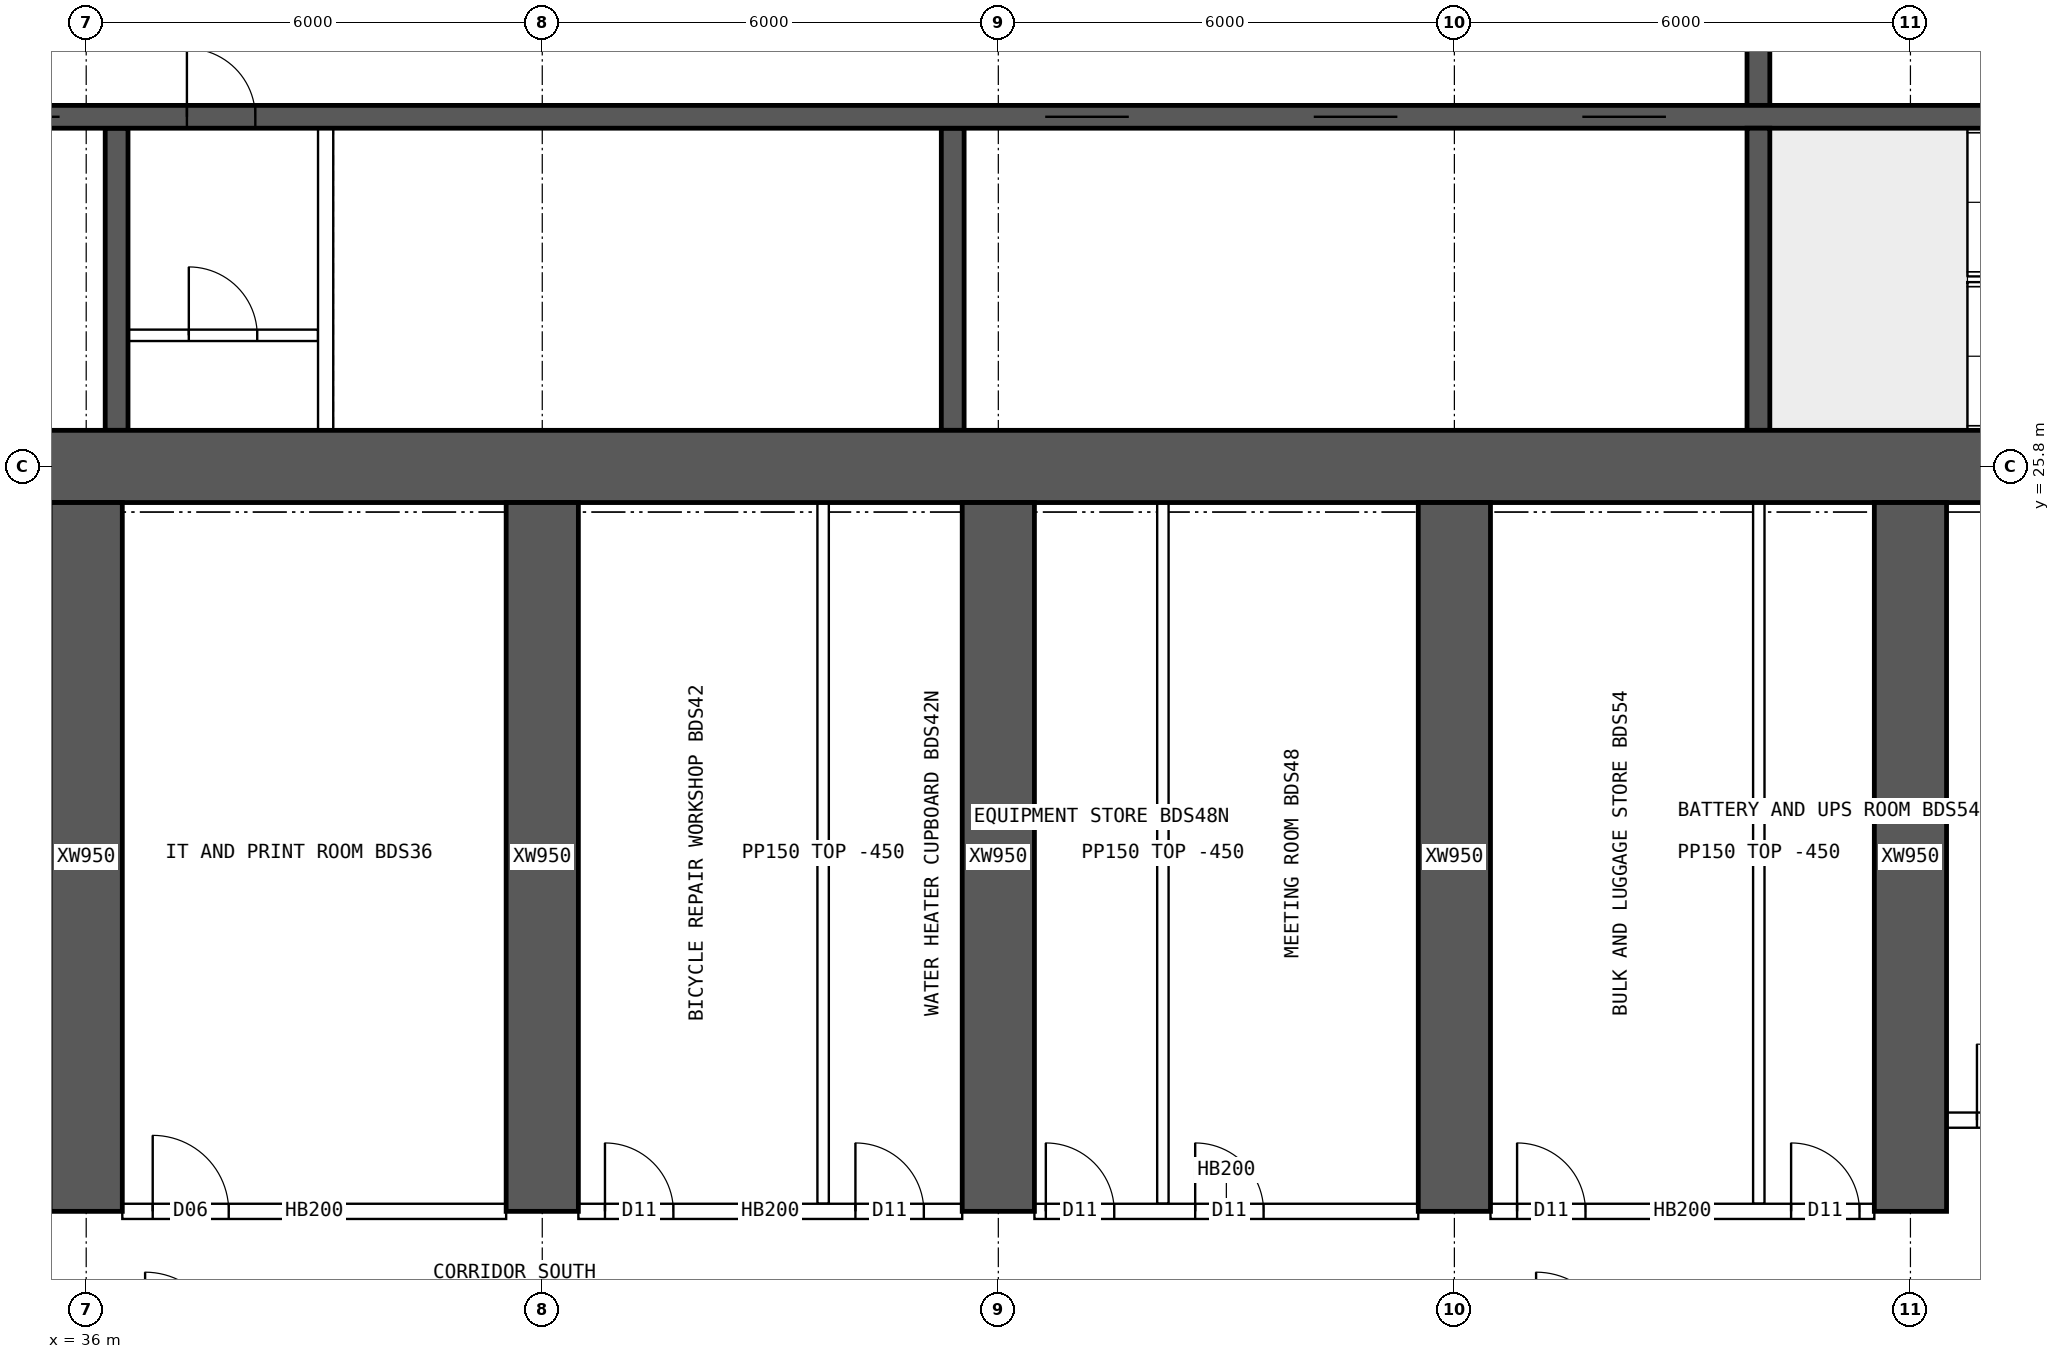
"""IFC4 building model, lengths in metres.
Left out: names, types, materials, properties, quantities, classifications, styles, units other than length and angle.
Written with IfcOpenShell. Run it as: python <this file> out.ifc"""

import sys

from ifc_helpers import new_model, si_unit, direction, frame, frame_2d, origin, place, context, subcontext, project, spatial, rectangle, extrude, element, fill, save


model = new_model("IFC4")
c1 = context("Model", 3, precision=1e-05, world=origin(), true_north=direction((0.0, 1.0)))
c2 = subcontext(c1, "Body", "Model", "MODEL_VIEW")
j1 = project(units=[si_unit("LENGTHUNIT", "METRE"), si_unit("PLANEANGLEUNIT", "RADIAN")], contexts=[c1])
p1 = place(None, origin())
s1 = spatial("IfcSite", under=j1, at=p1, CompositionType="ELEMENT")
p2 = place(p1, origin())
s2 = spatial("IfcBuilding", under=s1, at=p2, CompositionType="ELEMENT")
p3 = place(p2, frame((0.0, 0.0, 110.65)))
s3 = spatial("IfcBuildingStorey", under=s2, at=p3, CompositionType="ELEMENT", Elevation=110.65)
p4 = place(p3, frame((18.0, 25.8, 0.0), z_axis=(0.0, 0.0, 1.0), x_axis=(1.0, 0.0, 0.0)))
e1 = element("IfcWall", 1, at=p4, inside=s3, PredefinedType="SHEAR", context=c2, shape_type="SweptSolid", body=[
    extrude(rectangle(XDim=48.0, YDim=0.95, at=frame_2d((24.0, 0.0))), origin(), (0.0, 0.0, 1.0), 3.75),
])
p5 = place(p3, frame((18.475, 30.4, 0.0), z_axis=(0.0, 0.0, 1.0), x_axis=(1.0, 0.0, 0.0)))
e2 = element("IfcWall", 2, at=p5, inside=s3, PredefinedType="SHEAR", context=c2, shape_type="SweptSolid", body=[
    extrude(rectangle(XDim=47.05, YDim=0.3, at=frame_2d((23.525, 0.0))), origin(), (0.0, 0.0, 1.0), 3.75),
])
p6 = place(p5, frame((0.4, 0.0, 0.0)))
e3 = element("IfcOpeningElement", 3, at=p6, cuts=e2, PredefinedType="OPENING", context=c2, shape_type="SweptSolid", body=[
    extrude(rectangle(XDim=1.0, YDim=2.1, at=frame_2d((0.5, 1.05))), frame((0.0, 0.16, 0.0), z_axis=(0.0, -1.0, 0.0), x_axis=(1.0, 0.0, 0.0)), (0.0, 0.0, 1.0), 0.32),
])
p7 = place(p5, frame((45.65, 0.0, 0.0)))
e4 = element("IfcOpeningElement", 4, at=p7, cuts=e2, PredefinedType="OPENING", context=c2, shape_type="SweptSolid", body=[
    extrude(rectangle(XDim=1.0, YDim=2.1, at=frame_2d((0.5, 1.05))), frame((0.0, 0.16, 0.0), z_axis=(0.0, -1.0, 0.0), x_axis=(1.0, 0.0, 0.0)), (0.0, 0.0, 1.0), 0.32),
])
p8 = place(p5, frame((8.275, 0.0, 0.0)))
e5 = element("IfcOpeningElement", 5, at=p8, cuts=e2, PredefinedType="OPENING", context=c2, shape_type="SweptSolid", body=[
    extrude(rectangle(XDim=1.1, YDim=2.1, at=frame_2d((0.55, 1.05))), frame((0.0, 0.16, 0.0), z_axis=(0.0, -1.0, 0.0), x_axis=(1.0, 0.0, 0.0)), (0.0, 0.0, 1.0), 0.32),
])
p9 = place(p5, frame((10.875, 0.0, 0.0)))
e6 = element("IfcOpeningElement", 6, at=p9, cuts=e2, PredefinedType="OPENING", context=c2, shape_type="SweptSolid", body=[
    extrude(rectangle(XDim=1.1, YDim=2.1, at=frame_2d((0.55, 1.05))), frame((0.0, 0.16, 0.0), z_axis=(0.0, -1.0, 0.0), x_axis=(1.0, 0.0, 0.0)), (0.0, 0.0, 1.0), 0.32),
])
p10 = place(p5, frame((13.475, 0.0, 0.0)))
e7 = element("IfcOpeningElement", 7, at=p10, cuts=e2, PredefinedType="OPENING", context=c2, shape_type="SweptSolid", body=[
    extrude(rectangle(XDim=1.1, YDim=2.1, at=frame_2d((0.55, 1.05))), frame((0.0, 0.16, 0.0), z_axis=(0.0, -1.0, 0.0), x_axis=(1.0, 0.0, 0.0)), (0.0, 0.0, 1.0), 0.32),
])
p11 = place(p5, frame((16.075, 0.0, 0.0)))
e8 = element("IfcOpeningElement", 8, at=p11, cuts=e2, PredefinedType="OPENING", context=c2, shape_type="SweptSolid", body=[
    extrude(rectangle(XDim=1.1, YDim=2.1, at=frame_2d((0.55, 1.05))), frame((0.0, 0.16, 0.0), z_axis=(0.0, -1.0, 0.0), x_axis=(1.0, 0.0, 0.0)), (0.0, 0.0, 1.0), 0.32),
])
p12 = place(p5, frame((18.85, 0.0, 0.0)))
e9 = element("IfcOpeningElement", 9, at=p12, cuts=e2, PredefinedType="OPENING", context=c2, shape_type="SweptSolid", body=[
    extrude(rectangle(XDim=0.9, YDim=2.1, at=frame_2d((0.45, 1.05))), frame((0.0, 0.16, 0.0), z_axis=(0.0, -1.0, 0.0), x_axis=(1.0, 0.0, 0.0)), (0.0, 0.0, 1.0), 0.32),
])
p13 = place(p5, frame((30.142, 0.0, 0.0)))
e10 = element("IfcOpeningElement", 10, at=p13, cuts=e2, PredefinedType="OPENING", context=c2, shape_type="SweptSolid", body=[
    extrude(rectangle(XDim=1.1, YDim=2.1, at=frame_2d((0.55, 1.05))), frame((0.0, 0.16, 0.0), z_axis=(0.0, -1.0, 0.0), x_axis=(1.0, 0.0, 0.0)), (0.0, 0.0, 1.0), 0.32),
])
p14 = place(p5, frame((33.675, 0.0, 0.0)))
e11 = element("IfcOpeningElement", 11, at=p14, cuts=e2, PredefinedType="OPENING", context=c2, shape_type="SweptSolid", body=[
    extrude(rectangle(XDim=1.1, YDim=2.1, at=frame_2d((0.55, 1.05))), frame((0.0, 0.16, 0.0), z_axis=(0.0, -1.0, 0.0), x_axis=(1.0, 0.0, 0.0)), (0.0, 0.0, 1.0), 0.32),
])
p15 = place(p5, frame((37.208, 0.0, 0.0)))
e12 = element("IfcOpeningElement", 12, at=p15, cuts=e2, PredefinedType="OPENING", context=c2, shape_type="SweptSolid", body=[
    extrude(rectangle(XDim=1.1, YDim=2.1, at=frame_2d((0.55, 1.05))), frame((0.0, 0.16, 0.0), z_axis=(0.0, -1.0, 0.0), x_axis=(1.0, 0.0, 0.0)), (0.0, 0.0, 1.0), 0.32),
])
p16 = place(p3, frame((58.0, 26.275, 0.0), z_axis=(0.0, 0.0, 1.0), x_axis=(0.0, 1.0, 0.0)))
e13 = element("IfcWall", 13, at=p16, inside=s3, PredefinedType="SHEAR", context=c2, shape_type="SweptSolid", body=[
    extrude(rectangle(XDim=3.975, YDim=0.3, at=frame_2d((1.988, 0.0))), origin(), (0.0, 0.0, 1.0), 3.75),
])
p17 = place(p3, frame((58.0, 30.55, 0.0), z_axis=(0.0, 0.0, 1.0), x_axis=(0.0, 1.0, 0.0)))
e14 = element("IfcWall", 14, at=p17, inside=s3, PredefinedType="SHEAR", context=c2, shape_type="SweptSolid", body=[
    extrude(rectangle(XDim=3.9, YDim=0.3, at=frame_2d((1.95, 0.0))), origin(), (0.0, 0.0, 1.0), 3.75),
])
p18 = place(p17, frame((1.4, 0.0, 0.0)))
e15 = element("IfcOpeningElement", 15, at=p18, cuts=e14, PredefinedType="OPENING", context=c2, shape_type="SweptSolid", body=[
    extrude(rectangle(XDim=1.2, YDim=2.1, at=frame_2d((0.6, 1.05))), frame((0.0, 0.16, 0.0), z_axis=(0.0, -1.0, 0.0), x_axis=(1.0, 0.0, 0.0)), (0.0, 0.0, 1.0), 0.32),
])
for number, where, z_axis, x_axis in (
    (16, (36.4, 26.275, 0.0), (0.0, 0.0, 1.0), (0.0, 1.0, 0.0)),
    (17, (47.4, 26.275, 0.0), (0.0, 0.0, 1.0), (0.0, 1.0, 0.0)),
):
    element("IfcWall", number, at=place(p3, frame(where, z_axis=z_axis, x_axis=x_axis)), inside=s3, PredefinedType="SHEAR", context=c2, shape_type="SweptSolid", body=[
        extrude(rectangle(XDim=3.975, YDim=0.3, at=frame_2d((1.988, 0.0))), origin(), (0.0, 0.0, 1.0), 3.75),
    ])
for number, where, z_axis, x_axis in (
    (18, (36.0, 16.0, 0.0), (0.0, 0.0, 1.0), (0.0, 1.0, 0.0)),
    (19, (42.0, 16.0, 0.0), (0.0, 0.0, 1.0), (0.0, 1.0, 0.0)),
    (20, (48.0, 16.0, 0.0), (0.0, 0.0, 1.0), (0.0, 1.0, 0.0)),
    (21, (54.0, 16.0, 0.0), (0.0, 0.0, 1.0), (0.0, 1.0, 0.0)),
    (22, (60.0, 16.0, 0.0), (0.0, 0.0, 1.0), (0.0, 1.0, 0.0)),
):
    element("IfcWall", number, at=place(p3, frame(where, z_axis=z_axis, x_axis=x_axis)), inside=s3, PredefinedType="SHEAR", context=c2, shape_type="SweptSolid", body=[
        extrude(rectangle(XDim=9.325, YDim=0.95, at=frame_2d((4.663, 0.0))), origin(), (0.0, 0.0, 1.0), 3.75),
    ])
p19 = place(p3, frame((36.55, 27.525, 0.0), z_axis=(0.0, 0.0, 1.0), x_axis=(1.0, 0.0, 0.0)))
e23 = element("IfcWall", 23, at=p19, inside=s3, PredefinedType="SOLIDWALL", context=c2, shape_type="SweptSolid", body=[
    extrude(rectangle(XDim=2.5, YDim=0.15, at=frame_2d((1.25, 0.0))), origin(), (0.0, 0.0, 1.0), 3.3),
])
p20 = place(p19, frame((0.8, 0.0, 0.0)))
e24 = element("IfcOpeningElement", 24, at=p20, cuts=e23, PredefinedType="OPENING", context=c2, shape_type="SweptSolid", body=[
    extrude(rectangle(XDim=0.9, YDim=2.1, at=frame_2d((0.45, 1.05))), frame((0.0, 0.085, 0.0), z_axis=(0.0, -1.0, 0.0), x_axis=(1.0, 0.0, 0.0)), (0.0, 0.0, 1.0), 0.17),
])
p21 = place(p3, frame((39.15, 26.275, 0.0), z_axis=(0.0, 0.0, 1.0), x_axis=(0.0, 1.0, 0.0)))
e25 = element("IfcWall", 25, at=p21, inside=s3, PredefinedType="SOLIDWALL", context=c2, shape_type="SweptSolid", body=[
    extrude(rectangle(XDim=3.975, YDim=0.2, at=frame_2d((1.988, 0.0))), origin(), (0.0, 0.0, 1.0), 3.3),
])
p22 = place(p3, frame((36.475, 16.0, 0.0), z_axis=(0.0, 0.0, 1.0), x_axis=(1.0, 0.0, 0.0)))
e26 = element("IfcWall", 26, at=p22, inside=s3, PredefinedType="SOLIDWALL", context=c2, shape_type="SweptSolid", body=[
    extrude(rectangle(XDim=5.05, YDim=0.2, at=frame_2d((2.525, 0.0))), origin(), (0.0, 0.0, 1.0), 3.3),
])
p23 = place(p22, frame((0.4, 0.0, 0.0)))
e27 = element("IfcOpeningElement", 27, at=p23, cuts=e26, PredefinedType="OPENING", context=c2, shape_type="SweptSolid", body=[
    extrude(rectangle(XDim=1.0, YDim=2.1, at=frame_2d((0.5, 1.05))), frame((0.0, 0.11, 0.0), z_axis=(0.0, -1.0, 0.0), x_axis=(1.0, 0.0, 0.0)), (0.0, 0.0, 1.0), 0.22),
])
p24 = place(p3, frame((42.475, 16.0, 0.0), z_axis=(0.0, 0.0, 1.0), x_axis=(1.0, 0.0, 0.0)))
e28 = element("IfcWall", 28, at=p24, inside=s3, PredefinedType="SOLIDWALL", context=c2, shape_type="SweptSolid", body=[
    extrude(rectangle(XDim=5.05, YDim=0.2, at=frame_2d((2.525, 0.0))), origin(), (0.0, 0.0, 1.0), 3.3),
])
p25 = place(p24, frame((0.35, 0.0, 0.0)))
e29 = element("IfcOpeningElement", 29, at=p25, cuts=e28, PredefinedType="OPENING", context=c2, shape_type="SweptSolid", body=[
    extrude(rectangle(XDim=0.9, YDim=2.1, at=frame_2d((0.45, 1.05))), frame((0.0, 0.11, 0.0), z_axis=(0.0, -1.0, 0.0), x_axis=(1.0, 0.0, 0.0)), (0.0, 0.0, 1.0), 0.22),
])
p26 = place(p24, frame((3.645, 0.0, 0.0)))
e30 = element("IfcOpeningElement", 30, at=p26, cuts=e28, PredefinedType="OPENING", context=c2, shape_type="SweptSolid", body=[
    extrude(rectangle(XDim=0.9, YDim=2.1, at=frame_2d((0.45, 1.05))), frame((0.0, 0.11, 0.0), z_axis=(0.0, -1.0, 0.0), x_axis=(1.0, 0.0, 0.0)), (0.0, 0.0, 1.0), 0.22),
])
p27 = place(p3, frame((48.475, 16.0, 0.0), z_axis=(0.0, 0.0, 1.0), x_axis=(1.0, 0.0, 0.0)))
e31 = element("IfcWall", 31, at=p27, inside=s3, PredefinedType="SOLIDWALL", context=c2, shape_type="SweptSolid", body=[
    extrude(rectangle(XDim=5.05, YDim=0.2, at=frame_2d((2.525, 0.0))), origin(), (0.0, 0.0, 1.0), 3.3),
])
p28 = place(p27, frame((0.15, 0.0, 0.0)))
e32 = element("IfcOpeningElement", 32, at=p28, cuts=e31, PredefinedType="OPENING", context=c2, shape_type="SweptSolid", body=[
    extrude(rectangle(XDim=0.9, YDim=2.1, at=frame_2d((0.45, 1.05))), frame((0.0, 0.11, 0.0), z_axis=(0.0, -1.0, 0.0), x_axis=(1.0, 0.0, 0.0)), (0.0, 0.0, 1.0), 0.22),
])
p29 = place(p27, frame((2.115, 0.0, 0.0)))
e33 = element("IfcOpeningElement", 33, at=p29, cuts=e31, PredefinedType="OPENING", context=c2, shape_type="SweptSolid", body=[
    extrude(rectangle(XDim=0.9, YDim=2.1, at=frame_2d((0.45, 1.05))), frame((0.0, 0.11, 0.0), z_axis=(0.0, -1.0, 0.0), x_axis=(1.0, 0.0, 0.0)), (0.0, 0.0, 1.0), 0.22),
])
p30 = place(p3, frame((54.475, 16.0, 0.0), z_axis=(0.0, 0.0, 1.0), x_axis=(1.0, 0.0, 0.0)))
e34 = element("IfcWall", 34, at=p30, inside=s3, PredefinedType="SOLIDWALL", context=c2, shape_type="SweptSolid", body=[
    extrude(rectangle(XDim=5.05, YDim=0.2, at=frame_2d((2.525, 0.0))), origin(), (0.0, 0.0, 1.0), 3.3),
])
p31 = place(p30, frame((0.35, 0.0, 0.0)))
e35 = element("IfcOpeningElement", 35, at=p31, cuts=e34, PredefinedType="OPENING", context=c2, shape_type="SweptSolid", body=[
    extrude(rectangle(XDim=0.9, YDim=2.1, at=frame_2d((0.45, 1.05))), frame((0.0, 0.11, 0.0), z_axis=(0.0, -1.0, 0.0), x_axis=(1.0, 0.0, 0.0)), (0.0, 0.0, 1.0), 0.22),
])
p32 = place(p30, frame((3.955, 0.0, 0.0)))
e36 = element("IfcOpeningElement", 36, at=p32, cuts=e34, PredefinedType="OPENING", context=c2, shape_type="SweptSolid", body=[
    extrude(rectangle(XDim=0.9, YDim=2.1, at=frame_2d((0.45, 1.05))), frame((0.0, 0.11, 0.0), z_axis=(0.0, -1.0, 0.0), x_axis=(1.0, 0.0, 0.0)), (0.0, 0.0, 1.0), 0.22),
])
for number, where, z_axis, x_axis in (
    (37, (45.695, 16.1, 0.0), (0.0, 0.0, 1.0), (0.0, 1.0, 0.0)),
    (38, (50.165, 16.1, 0.0), (0.0, 0.0, 1.0), (0.0, 1.0, 0.0)),
    (39, (58.005, 16.1, 0.0), (0.0, 0.0, 1.0), (0.0, 1.0, 0.0)),
):
    element("IfcWall", number, at=place(p3, frame(where, z_axis=z_axis, x_axis=x_axis)), inside=s3, PredefinedType="PARTITIONING", context=c2, shape_type="SweptSolid", body=[
        extrude(rectangle(XDim=9.225, YDim=0.15, at=frame_2d((4.612, 0.0))), origin(), (0.0, 0.0, 1.0), 3.3),
    ])
p33 = place(p3, frame((60.475, 17.2, 0.0), z_axis=(0.0, 0.0, 1.0), x_axis=(1.0, 0.0, 0.0)))
e40 = element("IfcWall", 40, at=p33, inside=s3, PredefinedType="SOLIDWALL", context=c2, shape_type="SweptSolid", body=[
    extrude(rectangle(XDim=5.05, YDim=0.2, at=frame_2d((2.525, 0.0))), origin(), (0.0, 0.0, 1.0), 3.3),
])
p34 = place(p33, frame((0.4, 0.0, 0.0)))
e41 = element("IfcOpeningElement", 41, at=p34, cuts=e40, PredefinedType="OPENING", context=c2, shape_type="SweptSolid", body=[
    extrude(rectangle(XDim=1.0, YDim=2.1, at=frame_2d((0.5, 1.05))), frame((0.0, 0.11, 0.0), z_axis=(0.0, -1.0, 0.0), x_axis=(1.0, 0.0, 0.0)), (0.0, 0.0, 1.0), 0.22),
])
p35 = place(p11, origin())
e42 = element("IfcDoor", 42, at=p35, inside=s3, OperationType="DOUBLE_DOOR_SLIDING", PredefinedType="DOOR", context=c2, shape_type="SweptSolid", body=[
    extrude(rectangle(XDim=1.1, YDim=2.1, at=frame_2d((0.55, 1.05))), frame((0.0, 0.025, 0.0), z_axis=(0.0, -1.0, 0.0), x_axis=(1.0, 0.0, 0.0)), (0.0, 0.0, 1.0), 0.05),
])
fill(e8, e42)
p36 = place(p20, origin())
e43 = element("IfcDoor", 43, at=p36, inside=s3, OperationType="SINGLE_SWING_LEFT", PredefinedType="DOOR", context=c2, shape_type="SweptSolid", body=[
    extrude(rectangle(XDim=0.9, YDim=2.1, at=frame_2d((0.45, 1.05))), frame((0.0, 0.025, 0.0), z_axis=(0.0, -1.0, 0.0), x_axis=(1.0, 0.0, 0.0)), (0.0, 0.0, 1.0), 0.05),
])
fill(e24, e43)
p37 = place(p12, origin())
e44 = element("IfcDoor", 44, at=p37, inside=s3, OperationType="SINGLE_SWING_LEFT", PredefinedType="DOOR", context=c2, shape_type="SweptSolid", body=[
    extrude(rectangle(XDim=0.9, YDim=2.1, at=frame_2d((0.45, 1.05))), frame((0.0, 0.025, 0.0), z_axis=(0.0, -1.0, 0.0), x_axis=(1.0, 0.0, 0.0)), (0.0, 0.0, 1.0), 0.05),
])
fill(e9, e44)
p38 = place(p13, origin())
e45 = element("IfcDoor", 45, at=p38, inside=s3, OperationType="DOUBLE_DOOR_SLIDING", PredefinedType="DOOR", context=c2, shape_type="SweptSolid", body=[
    extrude(rectangle(XDim=1.1, YDim=2.1, at=frame_2d((0.55, 1.05))), frame((0.0, 0.025, 0.0), z_axis=(0.0, -1.0, 0.0), x_axis=(1.0, 0.0, 0.0)), (0.0, 0.0, 1.0), 0.05),
])
fill(e10, e45)
p39 = place(p14, origin())
e46 = element("IfcDoor", 46, at=p39, inside=s3, OperationType="DOUBLE_DOOR_SLIDING", PredefinedType="DOOR", context=c2, shape_type="SweptSolid", body=[
    extrude(rectangle(XDim=1.1, YDim=2.1, at=frame_2d((0.55, 1.05))), frame((0.0, 0.025, 0.0), z_axis=(0.0, -1.0, 0.0), x_axis=(1.0, 0.0, 0.0)), (0.0, 0.0, 1.0), 0.05),
])
fill(e11, e46)
p40 = place(p15, origin())
e47 = element("IfcDoor", 47, at=p40, inside=s3, OperationType="DOUBLE_DOOR_SLIDING", PredefinedType="DOOR", context=c2, shape_type="SweptSolid", body=[
    extrude(rectangle(XDim=1.1, YDim=2.1, at=frame_2d((0.55, 1.05))), frame((0.0, 0.025, 0.0), z_axis=(0.0, -1.0, 0.0), x_axis=(1.0, 0.0, 0.0)), (0.0, 0.0, 1.0), 0.05),
])
fill(e12, e47)
p41 = place(p23, origin())
e48 = element("IfcDoor", 48, at=p41, inside=s3, OperationType="SINGLE_SWING_LEFT", PredefinedType="DOOR", context=c2, shape_type="SweptSolid", body=[
    extrude(rectangle(XDim=1.0, YDim=2.1, at=frame_2d((0.5, 1.05))), frame((0.0, 0.025, 0.0), z_axis=(0.0, -1.0, 0.0), x_axis=(1.0, 0.0, 0.0)), (0.0, 0.0, 1.0), 0.05),
])
fill(e27, e48)
p42 = place(p25, origin())
e49 = element("IfcDoor", 49, at=p42, inside=s3, OperationType="SINGLE_SWING_LEFT", PredefinedType="DOOR", context=c2, shape_type="SweptSolid", body=[
    extrude(rectangle(XDim=0.9, YDim=2.1, at=frame_2d((0.45, 1.05))), frame((0.0, 0.025, 0.0), z_axis=(0.0, -1.0, 0.0), x_axis=(1.0, 0.0, 0.0)), (0.0, 0.0, 1.0), 0.05),
])
fill(e29, e49)
p43 = place(p26, origin())
e50 = element("IfcDoor", 50, at=p43, inside=s3, OperationType="SINGLE_SWING_LEFT", PredefinedType="DOOR", context=c2, shape_type="SweptSolid", body=[
    extrude(rectangle(XDim=0.9, YDim=2.1, at=frame_2d((0.45, 1.05))), frame((0.0, 0.025, 0.0), z_axis=(0.0, -1.0, 0.0), x_axis=(1.0, 0.0, 0.0)), (0.0, 0.0, 1.0), 0.05),
])
fill(e30, e50)
p44 = place(p28, origin())
e51 = element("IfcDoor", 51, at=p44, inside=s3, OperationType="SINGLE_SWING_LEFT", PredefinedType="DOOR", context=c2, shape_type="SweptSolid", body=[
    extrude(rectangle(XDim=0.9, YDim=2.1, at=frame_2d((0.45, 1.05))), frame((0.0, 0.025, 0.0), z_axis=(0.0, -1.0, 0.0), x_axis=(1.0, 0.0, 0.0)), (0.0, 0.0, 1.0), 0.05),
])
fill(e32, e51)
p45 = place(p29, origin())
e52 = element("IfcDoor", 52, at=p45, inside=s3, OperationType="SINGLE_SWING_LEFT", PredefinedType="DOOR", context=c2, shape_type="SweptSolid", body=[
    extrude(rectangle(XDim=0.9, YDim=2.1, at=frame_2d((0.45, 1.05))), frame((0.0, 0.025, 0.0), z_axis=(0.0, -1.0, 0.0), x_axis=(1.0, 0.0, 0.0)), (0.0, 0.0, 1.0), 0.05),
])
fill(e33, e52)
p46 = place(p31, origin())
e53 = element("IfcDoor", 53, at=p46, inside=s3, OperationType="SINGLE_SWING_LEFT", PredefinedType="DOOR", context=c2, shape_type="SweptSolid", body=[
    extrude(rectangle(XDim=0.9, YDim=2.1, at=frame_2d((0.45, 1.05))), frame((0.0, 0.025, 0.0), z_axis=(0.0, -1.0, 0.0), x_axis=(1.0, 0.0, 0.0)), (0.0, 0.0, 1.0), 0.05),
])
fill(e35, e53)
p47 = place(p32, origin())
e54 = element("IfcDoor", 54, at=p47, inside=s3, OperationType="SINGLE_SWING_LEFT", PredefinedType="DOOR", context=c2, shape_type="SweptSolid", body=[
    extrude(rectangle(XDim=0.9, YDim=2.1, at=frame_2d((0.45, 1.05))), frame((0.0, 0.025, 0.0), z_axis=(0.0, -1.0, 0.0), x_axis=(1.0, 0.0, 0.0)), (0.0, 0.0, 1.0), 0.05),
])
fill(e36, e54)
p48 = place(p34, origin())
e55 = element("IfcDoor", 55, at=p48, inside=s3, OperationType="SINGLE_SWING_LEFT", PredefinedType="DOOR", context=c2, shape_type="SweptSolid", body=[
    extrude(rectangle(XDim=1.0, YDim=2.1, at=frame_2d((0.5, 1.05))), frame((0.0, 0.025, 0.0), z_axis=(0.0, -1.0, 0.0), x_axis=(1.0, 0.0, 0.0)), (0.0, 0.0, 1.0), 0.05),
])
fill(e41, e55)
save(model, sys.argv[1])
